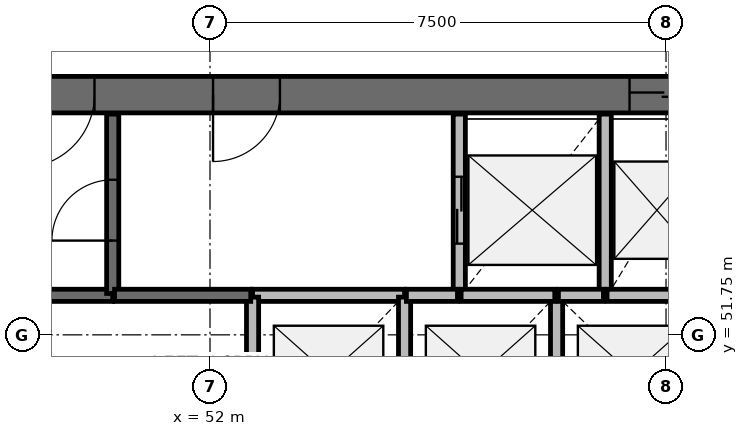
"""IFC4 building model, lengths in metres.
Left out: names, types, materials, properties, quantities, classifications, styles, units other than length and angle.
Written with IfcOpenShell. Run it as: python <this file> out.ifc"""

import sys

from ifc_helpers import new_model, si_unit, direction, frame, frame_2d, origin, place, context, subcontext, project, spatial, rectangle, extrude, source, transform, mapped, element, fill, save


model = new_model("IFC4")
c1 = context("Model", 3, precision=1e-05, world=origin(), true_north=direction((0.0, 1.0)))
c2 = subcontext(c1, "Body", "Model", "MODEL_VIEW")
j1 = project(units=[si_unit("LENGTHUNIT", "METRE"), si_unit("PLANEANGLEUNIT", "RADIAN")], contexts=[c1])
p1 = place(None, origin())
s1 = spatial("IfcSite", under=j1, at=p1, CompositionType="ELEMENT")
p2 = place(p1, origin())
s2 = spatial("IfcBuilding", under=s1, at=p2, CompositionType="ELEMENT")
p3 = place(p2, frame((0.0, 0.0, 199.4)))
s3 = spatial("IfcBuildingStorey", under=s2, at=p3, CompositionType="ELEMENT", Elevation=199.4)
p4 = place(p3, frame((60.4, 55.7, 0.0), z_axis=(0.0, 0.0, 1.0), x_axis=(-1.0, 0.0, 0.0)))
e1 = element("IfcWall", 1, at=p4, inside=s3, PredefinedType="SHEAR", context=c2, shape_type="SweptSolid", body=[
    extrude(rectangle(XDim=16.8, YDim=0.6, at=frame_2d((8.4, 0.0))), origin(), (0.0, 0.0, 1.0), 3.9),
])
p5 = place(p4, frame((0.4, 0.0, 0.0)))
e2 = element("IfcOpeningElement", 2, at=p5, cuts=e1, PredefinedType="OPENING", context=c2, shape_type="SweptSolid", body=[
    extrude(rectangle(XDim=1.1, YDim=2.1, at=frame_2d((0.55, 1.05))), frame((0.0, 0.31, 0.0), z_axis=(0.0, -1.0, 0.0), x_axis=(1.0, 0.0, 0.0)), (0.0, 0.0, 1.0), 0.62),
])
p6 = place(p4, frame((10.3, 0.0, 0.0)))
e3 = element("IfcOpeningElement", 3, at=p6, cuts=e1, PredefinedType="OPENING", context=c2, shape_type="SweptSolid", body=[
    extrude(rectangle(XDim=1.2, YDim=2.1, at=frame_2d((0.6, 1.05))), frame((0.0, 0.31, 0.0), z_axis=(0.0, -1.0, 0.0), x_axis=(1.0, 0.0, 0.0)), (0.0, 0.0, 1.0), 0.62),
])
p7 = place(p4, frame((7.25, 0.0, 0.0)))
e4 = element("IfcOpeningElement", 4, at=p7, cuts=e1, PredefinedType="OPENING", context=c2, shape_type="SweptSolid", body=[
    extrude(rectangle(XDim=1.1, YDim=2.1, at=frame_2d((0.55, 1.05))), frame((0.0, 0.31, 0.0), z_axis=(0.0, -1.0, 0.0), x_axis=(1.0, 0.0, 0.0)), (0.0, 0.0, 1.0), 0.62),
])
p8 = place(p3, frame((43.62, 52.4, 0.0), z_axis=(0.0, 0.0, 1.0), x_axis=(1.0, 0.0, 0.0)))
e5 = element("IfcWall", 5, at=p8, inside=s3, PredefinedType="SOLIDWALL", context=c2, shape_type="SweptSolid", body=[
    extrude(rectangle(XDim=6.78, YDim=0.2, at=frame_2d((3.39, 0.0))), origin(), (0.0, 0.0, 1.0), 3.58),
])
p9 = place(p3, frame((50.4, 52.43, 0.0), z_axis=(0.0, 0.0, 1.0), x_axis=(0.0, 1.0, 0.0)))
e6 = element("IfcWall", 6, at=p9, inside=s3, PredefinedType="SOLIDWALL", context=c2, shape_type="SweptSolid", body=[
    extrude(rectangle(XDim=2.95, YDim=0.2, at=frame_2d((1.475, 0.0))), origin(), (0.0, 0.0, 1.0), 3.58),
])
p10 = place(p9, frame((0.87, 0.0, 0.0)))
e7 = element("IfcOpeningElement", 7, at=p10, cuts=e6, PredefinedType="OPENING", context=c2, shape_type="SweptSolid", body=[
    extrude(rectangle(XDim=1.0, YDim=2.1, at=frame_2d((0.5, 1.05))), frame((0.0, 0.11, 0.0), z_axis=(0.0, -1.0, 0.0), x_axis=(1.0, 0.0, 0.0)), (0.0, 0.0, 1.0), 0.22),
])
p11 = place(p3, frame((56.1, 55.38, 0.0), z_axis=(0.0, 0.0, 1.0), x_axis=(0.0, -1.0, 0.0)))
e8 = element("IfcWall", 8, at=p11, inside=s3, PredefinedType="SOLIDWALL", context=c2, shape_type="SweptSolid", body=[
    extrude(rectangle(XDim=2.98, YDim=0.2, at=frame_2d((1.49, 0.0))), origin(), (0.0, 0.0, 1.0), 3.58),
])
p12 = place(p11, frame((1.03, 0.0, 0.0)))
e9 = element("IfcOpeningElement", 9, at=p12, cuts=e8, PredefinedType="OPENING", context=c2, shape_type="SweptSolid", body=[
    extrude(rectangle(XDim=1.1, YDim=2.1, at=frame_2d((0.55, 1.05))), frame((0.0, 0.11, 0.0), z_axis=(0.0, -1.0, 0.0), x_axis=(1.0, 0.0, 0.0)), (0.0, 0.0, 1.0), 0.22),
])
p13 = place(p3, frame((58.5, 52.4, 0.0), z_axis=(0.0, 0.0, 1.0), x_axis=(0.0, 1.0, 0.0)))
e10 = element("IfcWall", 10, at=p13, inside=s3, PredefinedType="SOLIDWALL", context=c2, shape_type="SweptSolid", body=[
    extrude(rectangle(XDim=2.98, YDim=0.2, at=frame_2d((1.49, 0.0))), origin(), (0.0, 0.0, 1.0), 3.58),
])
p14 = place(p3, frame((55.2, 52.4, 0.0), z_axis=(0.0, 0.0, 1.0), x_axis=(-1.0, 0.0, 0.0)))
e11 = element("IfcWall", 11, at=p14, inside=s3, PredefinedType="SOLIDWALL", context=c2, shape_type="SweptSolid", body=[
    extrude(rectangle(XDim=2.5, YDim=0.2, at=frame_2d((1.25, 0.0))), origin(), (0.0, 0.0, 1.0), 3.58),
])
for number, where, z_axis, x_axis in (
    (12, (52.7, 52.37, 0.0), (0.0, 0.0, 1.0), (0.0, -1.0, 0.0)),
    (13, (55.2, 50.01, 0.0), (0.0, 0.0, 1.0), (0.0, 1.0, 0.0)),
):
    element("IfcWall", number, at=place(p3, frame(where, z_axis=z_axis, x_axis=x_axis)), inside=s3, PredefinedType="SOLIDWALL", context=c2, shape_type="SweptSolid", body=[
        extrude(rectangle(XDim=2.36, YDim=0.2, at=frame_2d((1.18, 0.0))), origin(), (0.0, 0.0, 1.0), 3.58),
    ])
p15 = place(p3, frame((57.7, 50.01, 0.0), z_axis=(0.0, 0.0, 1.0), x_axis=(0.0, 1.0, 0.0)))
e14 = element("IfcWall", 14, at=p15, inside=s3, PredefinedType="SOLIDWALL", context=c2, shape_type="SweptSolid", body=[
    extrude(rectangle(XDim=2.39, YDim=0.2, at=frame_2d((1.195, 0.0))), origin(), (0.0, 0.0, 1.0), 3.58),
])
p16 = place(p3, frame((50.43, 52.4, 0.0), z_axis=(0.0, 0.0, 1.0), x_axis=(1.0, 0.0, 0.0)))
e15 = element("IfcWall", 15, at=p16, inside=s3, PredefinedType="SOLIDWALL", context=c2, shape_type="SweptSolid", body=[
    extrude(rectangle(XDim=2.24, YDim=0.2, at=frame_2d((1.12, 0.0))), origin(), (0.0, 0.0, 1.0), 3.58),
])
p17 = place(p3, frame((60.38, 52.4, 0.0), z_axis=(0.0, 0.0, 1.0), x_axis=(-1.0, 0.0, 0.0)))
e16 = element("IfcWall", 16, at=p17, inside=s3, PredefinedType="SOLIDWALL", context=c2, shape_type="SweptSolid", body=[
    extrude(rectangle(XDim=1.85, YDim=0.2, at=frame_2d((0.925, 0.0))), origin(), (0.0, 0.0, 1.0), 3.58),
])
p18 = place(p3, frame((57.67, 52.4, 0.0), z_axis=(0.0, 0.0, 1.0), x_axis=(-1.0, 0.0, 0.0)))
e17 = element("IfcWall", 17, at=p18, inside=s3, PredefinedType="SOLIDWALL", context=c2, shape_type="SweptSolid", body=[
    extrude(rectangle(XDim=1.54, YDim=0.2, at=frame_2d((0.77, 0.0))), origin(), (0.0, 0.0, 1.0), 3.58),
])
p19 = place(p3, frame((56.07, 52.4, 0.0), z_axis=(0.0, 0.0, 1.0), x_axis=(-1.0, 0.0, 0.0)))
e18 = element("IfcWall", 18, at=p19, inside=s3, PredefinedType="SOLIDWALL", context=c2, shape_type="SweptSolid", body=[
    extrude(rectangle(XDim=0.84, YDim=0.2, at=frame_2d((0.42, 0.0))), origin(), (0.0, 0.0, 1.0), 3.58),
])
p20 = place(p3, frame((58.47, 52.4, 0.0), z_axis=(0.0, 0.0, 1.0), x_axis=(-1.0, 0.0, 0.0)))
e19 = element("IfcWall", 19, at=p20, inside=s3, PredefinedType="SOLIDWALL", context=c2, shape_type="SweptSolid", body=[
    extrude(rectangle(XDim=0.74, YDim=0.2, at=frame_2d((0.37, 0.0))), origin(), (0.0, 0.0, 1.0), 3.58),
])
m1 = source(origin(), c2, "Body", "SweptSolid", [
    extrude(rectangle(XDim=1.1, YDim=2.1, at=frame_2d((0.55, 1.05))), frame((0.0, 0.025, 0.0), z_axis=(0.0, -1.0, 0.0), x_axis=(1.0, 0.0, 0.0)), (0.0, 0.0, 1.0), 0.05),
])
p21 = place(p12, origin())
e20 = element("IfcDoor", 20, at=p21, inside=s3, OperationType="DOUBLE_DOOR_SLIDING", PredefinedType="USERDEFINED", context=c2, shape_type="MappedRepresentation", body=[
    mapped(m1, transform((0.0, 0.0, 0.0), scale=1.0)),
])
fill(e9, e20)
p22 = place(p5, origin())
e21 = element("IfcDoor", 21, at=p22, inside=s3, OperationType="DOUBLE_DOOR_SLIDING", PredefinedType="USERDEFINED", context=c2, shape_type="MappedRepresentation", body=[
    mapped(m1, transform((0.0, 0.0, 0.0), scale=1.0)),
])
fill(e2, e21)
m2 = source(origin(), c2, "Body", "SweptSolid", [
    extrude(rectangle(XDim=1.2, YDim=2.1, at=frame_2d((0.6, 1.05))), frame((0.0, 0.025, 0.0), z_axis=(0.0, -1.0, 0.0), x_axis=(1.0, 0.0, 0.0)), (0.0, 0.0, 1.0), 0.05),
])
p23 = place(p6, origin())
e22 = element("IfcDoor", 22, at=p23, inside=s3, OperationType="SINGLE_SWING_RIGHT", PredefinedType="DOOR", context=c2, shape_type="MappedRepresentation", body=[
    mapped(m2, transform((0.0, 0.0, 0.0), scale=1.0)),
])
fill(e3, e22)
m3 = source(origin(), c2, "Body", "SweptSolid", [
    extrude(rectangle(XDim=1.0, YDim=2.1, at=frame_2d((0.5, 1.05))), frame((0.0, 0.025, 0.0), z_axis=(0.0, -1.0, 0.0), x_axis=(1.0, 0.0, 0.0)), (0.0, 0.0, 1.0), 0.05),
])
p24 = place(p10, origin())
e23 = element("IfcDoor", 23, at=p24, inside=s3, OperationType="SINGLE_SWING_LEFT", PredefinedType="DOOR", context=c2, shape_type="MappedRepresentation", body=[
    mapped(m3, transform((0.0, 0.0, 0.0), scale=1.0)),
])
fill(e7, e23)
m4 = source(origin(), c2, "Body", "SweptSolid", [
    extrude(rectangle(XDim=1.1, YDim=2.1, at=frame_2d((0.55, 1.05))), frame((0.0, 0.025, 0.0), z_axis=(0.0, -1.0, 0.0), x_axis=(1.0, 0.0, 0.0)), (0.0, 0.0, 1.0), 0.05),
])
p25 = place(p7, origin())
e24 = element("IfcDoor", 24, at=p25, inside=s3, OperationType="SINGLE_SWING_RIGHT", PredefinedType="DOOR", context=c2, shape_type="MappedRepresentation", body=[
    mapped(m4, transform((0.0, 0.0, 0.0), scale=1.0)),
])
fill(e4, e24)
save(model, sys.argv[1])
